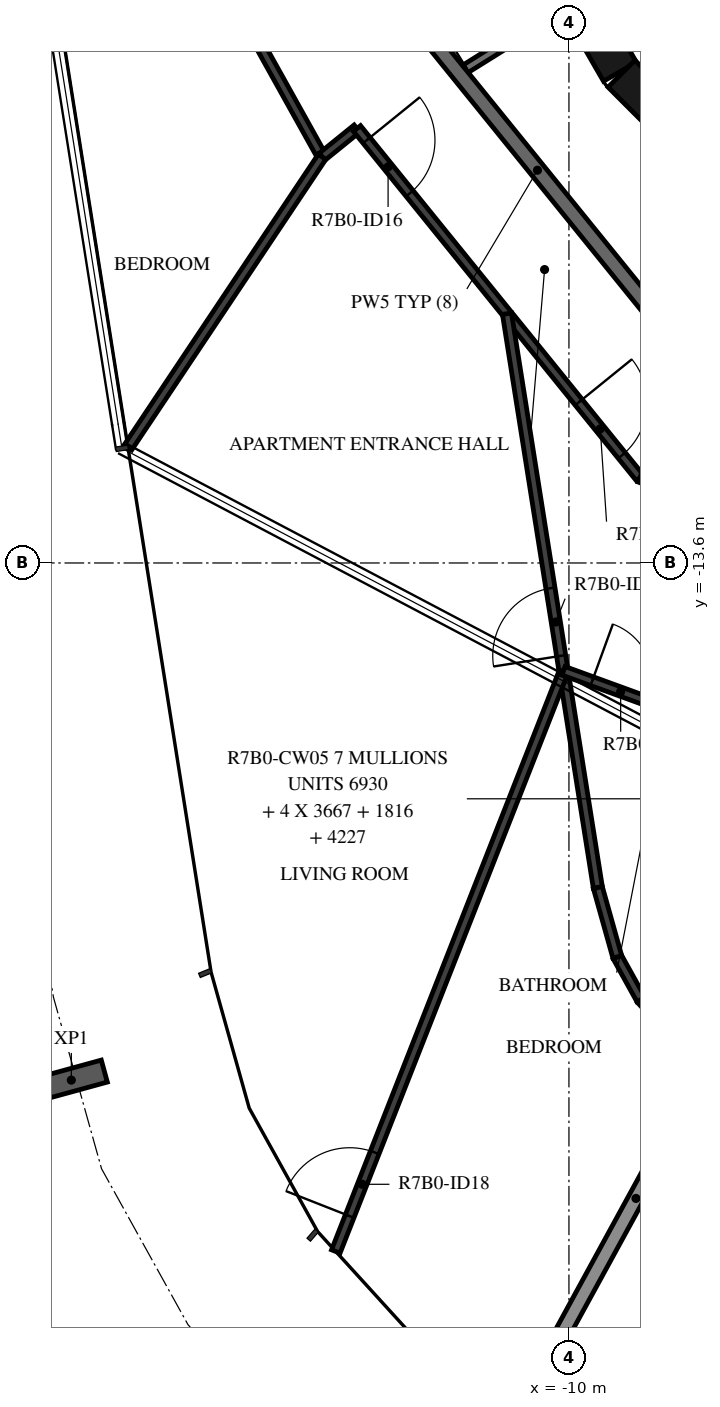
"""IFC4 building model, lengths in metres.
Left out: names, types, materials, properties, quantities, classifications, styles, units other than length and angle.
Written with IfcOpenShell. Run it as: python <this file> out.ifc"""

import sys

from ifc_helpers import new_model, si_unit, direction, frame, frame_2d, origin, origin_2d, place, context, subcontext, project, spatial, rectangle, i_section, extrude, element, fill, save


model = new_model("IFC4")
c1 = context("Model", 3, precision=1e-05, world=origin(), true_north=direction((0.0, 1.0)))
c2 = subcontext(c1, "Body", "Model", "MODEL_VIEW")
j1 = project(units=[si_unit("LENGTHUNIT", "METRE"), si_unit("PLANEANGLEUNIT", "RADIAN")], contexts=[c1])
p1 = place(None, origin())
s1 = spatial("IfcSite", under=j1, at=p1, CompositionType="ELEMENT")
p2 = place(p1, origin())
s2 = spatial("IfcBuilding", under=s1, at=p2, CompositionType="ELEMENT")
p3 = place(p2, frame((0.0, 0.0, 277.4)))
s3 = spatial("IfcBuildingStorey", under=s2, at=p3, CompositionType="ELEMENT", Elevation=277.4)
p4 = place(p3, frame((-16.547, -20.404, -0.38), z_axis=(0.0, 0.0, 1.0), x_axis=(-0.264568938302, 0.964366775084, 0.0)))
e1 = element("IfcColumn", 1, at=p4, inside=s3, PredefinedType="COLUMN", context=c2, shape_type="SweptSolid", body=[
    extrude(i_section(OverallWidth=0.3, OverallDepth=0.9, WebThickness=0.019, FlangeThickness=0.035, FilletRadius=0.03, at=origin_2d()), origin(), (0.0, 0.0, 1.0), 3.5),
])
p5 = place(p3, frame((-10.845, -4.51, 0.0), z_axis=(0.0, 0.0, 1.0), x_axis=(0.500087131594, -0.865975092491, 0.0)))
e2 = element("IfcWall", 2, at=p5, inside=s3, PredefinedType="SHEAR", context=c2, shape_type="SweptSolid", body=[
    extrude(rectangle(XDim=3.033, YDim=0.5, at=frame_2d((1.516, 0.0))), origin(), (0.0, 0.0, 1.0), 3.12),
])
p6 = place(p3, frame((-9.308, -7.164, 0.0), z_axis=(0.0, 0.0, 1.0), x_axis=(0.707106781187, -0.707106781187, 0.0)))
e3 = element("IfcWall", 3, at=p6, inside=s3, PredefinedType="SHEAR", context=c2, shape_type="SweptSolid", body=[
    extrude(rectangle(XDim=3.032, YDim=0.5, at=frame_2d((1.516, 0.0))), origin(), (0.0, 0.0, 1.0), 3.12),
])
p7 = place(p3, frame((-11.449, -7.154, 0.0), z_axis=(0.0, 0.0, 1.0), x_axis=(0.848067047543, 0.529888934468, 0.0)))
e4 = element("IfcWall", 4, at=p7, inside=s3, PredefinedType="PARTITIONING", context=c2, shape_type="SweptSolid", body=[
    extrude(rectangle(XDim=1.596, YDim=0.12, at=frame_2d((0.798, 0.0))), origin(), (0.0, 0.0, 1.0), 3.12),
])
p8 = place(p7, frame((0.12, 0.0, 0.0)))
e5 = element("IfcOpeningElement", 5, at=p8, cuts=e4, PredefinedType="OPENING", context=c2, shape_type="SweptSolid", body=[
    extrude(rectangle(XDim=1.2, YDim=2.1, at=frame_2d((0.6, 1.05))), frame((0.0, 0.07, 0.0), z_axis=(0.0, -1.0, 0.0), x_axis=(1.0, 0.0, 0.0)), (0.0, 0.0, 1.0), 0.14),
])
p9 = place(p3, frame((-12.673, -5.643, 0.0), z_axis=(0.0, 0.0, 1.0), x_axis=(0.629302871585, -0.777160148113, 0.0)))
e6 = element("IfcWall", 6, at=p9, inside=s3, PredefinedType="STANDARD", context=c2, shape_type="SweptSolid", body=[
    extrude(rectangle(XDim=7.181, YDim=0.2, at=frame_2d((3.59, 0.0))), origin(), (0.0, 0.0, 1.0), 3.12),
])
p10 = place(p3, frame((-10.637, -24.738, 0.0), z_axis=(0.0, 0.0, 1.0), x_axis=(0.479683887596, 0.877441375808, 0.0)))
e7 = element("IfcWall", 7, at=p10, inside=s3, PredefinedType="STANDARD", context=c2, shape_type="SweptSolid", body=[
    extrude(rectangle(XDim=6.333, YDim=0.2, at=frame_2d((3.166, 0.0))), origin(), (0.0, 0.0, 1.0), 2.73),
])
p11 = place(p3, frame((-14.088, -6.749, 0.0), z_axis=(0.0, 0.0, 1.0), x_axis=(0.486723752783, -0.873555944675, 0.0)))
e8 = element("IfcWall", 8, at=p11, inside=s3, PredefinedType="PARTITIONING", context=c2, shape_type="SweptSolid", body=[
    extrude(rectangle(XDim=1.726, YDim=0.12, at=frame_2d((0.863, 0.0))), origin(), (0.0, 0.0, 1.0), 3.12),
])
p12 = place(p3, frame((-13.248, -8.257, 0.0), z_axis=(0.0, 0.0, 1.0), x_axis=(0.777071947771, 0.629411779352, 0.0)))
e9 = element("IfcWall", 9, at=p12, inside=s3, PredefinedType="PARTITIONING", context=c2, shape_type="SweptSolid", body=[
    extrude(rectangle(XDim=0.592, YDim=0.12, at=frame_2d((0.296, 0.0))), origin(), (0.0, 0.0, 1.0), 3.12),
])
p13 = place(p3, frame((-12.788, -7.884, 0.0), z_axis=(0.0, 0.0, 1.0), x_axis=(0.6293312414, -0.777137174891, 0.0)))
e10 = element("IfcWall", 10, at=p13, inside=s3, PredefinedType="PARTITIONING", context=c2, shape_type="SweptSolid", body=[
    extrude(rectangle(XDim=5.913, YDim=0.12, at=frame_2d((2.957, 0.0))), origin(), (0.0, 0.0, 1.0), 3.12),
])
p14 = place(p13, frame((0.2, 0.0, 0.0)))
e11 = element("IfcOpeningElement", 11, at=p14, cuts=e10, PredefinedType="OPENING", context=c2, shape_type="SweptSolid", body=[
    extrude(rectangle(XDim=0.9, YDim=2.1, at=frame_2d((0.45, 1.05))), frame((0.0, 0.07, 0.0), z_axis=(0.0, -1.0, 0.0), x_axis=(1.0, 0.0, 0.0)), (0.0, 0.0, 1.0), 0.14),
])
p15 = place(p13, frame((4.635, 0.0, 0.0)))
e12 = element("IfcOpeningElement", 12, at=p15, cuts=e10, PredefinedType="OPENING", context=c2, shape_type="SweptSolid", body=[
    extrude(rectangle(XDim=0.9, YDim=2.1, at=frame_2d((0.45, 1.05))), frame((0.0, 0.07, 0.0), z_axis=(0.0, -1.0, 0.0), x_axis=(1.0, 0.0, 0.0)), (0.0, 0.0, 1.0), 0.14),
])
p16 = place(p3, frame((-9.067, -12.479, 0.0), z_axis=(0.0, 0.0, 1.0), x_axis=(0.933579449035, -0.358370495911, 0.0)))
e13 = element("IfcWall", 13, at=p16, inside=s3, PredefinedType="PARTITIONING", context=c2, shape_type="SweptSolid", body=[
    extrude(rectangle(XDim=7.985, YDim=0.12, at=frame_2d((3.992, 0.0))), origin(), (0.0, 0.0, 1.0), 3.12),
])
p17 = place(p16, frame((4.192, 0.0, 0.0)))
e14 = element("IfcOpeningElement", 14, at=p17, cuts=e13, PredefinedType="OPENING", context=c2, shape_type="SweptSolid", body=[
    extrude(rectangle(XDim=0.9, YDim=2.1, at=frame_2d((0.45, 1.05))), frame((0.0, 0.07, 0.0), z_axis=(0.0, -1.0, 0.0), x_axis=(1.0, 0.0, 0.0)), (0.0, 0.0, 1.0), 0.14),
])
p18 = place(p3, frame((-15.802, -12.08, 0.0), z_axis=(0.0, 0.0, 1.0), x_axis=(0.555386305099, 0.831592479589, 0.0)))
e15 = element("IfcWall", 15, at=p18, inside=s3, PredefinedType="PARTITIONING", context=c2, shape_type="SweptSolid", body=[
    extrude(rectangle(XDim=4.597, YDim=0.12, at=frame_2d((2.299, 0.0))), origin(), (0.0, 0.0, 1.0), 3.12),
])
p19 = place(p3, frame((-9.619, -17.871, 0.0), z_axis=(0.0, 0.0, 1.0), x_axis=(-0.156433255633, 0.987688532146, 0.0)))
e16 = element("IfcWall", 16, at=p19, inside=s3, PredefinedType="PARTITIONING", context=c2, shape_type="SweptSolid", body=[
    extrude(rectangle(XDim=7.644, YDim=0.12, at=frame_2d((3.822, 0.0))), origin(), (0.0, 0.0, 1.0), 3.12),
])
p20 = place(p19, frame((3.087, 0.0, 0.0)))
e17 = element("IfcOpeningElement", 17, at=p20, cuts=e16, PredefinedType="OPENING", context=c2, shape_type="SweptSolid", body=[
    extrude(rectangle(XDim=0.9, YDim=2.1, at=frame_2d((0.45, 1.05))), frame((0.0, 0.07, 0.0), z_axis=(0.0, -1.0, 0.0), x_axis=(1.0, 0.0, 0.0)), (0.0, 0.0, 1.0), 0.14),
])
p21 = place(p3, frame((-13.067, -22.658, 0.0), z_axis=(0.0, 0.0, 1.0), x_axis=(0.365785999331, 0.930698986082, 0.0)))
e18 = element("IfcWall", 18, at=p21, inside=s3, PredefinedType="PARTITIONING", context=c2, shape_type="SweptSolid", body=[
    extrude(rectangle(XDim=8.196, YDim=0.12, at=frame_2d((4.098, 0.0))), origin(), (0.0, 0.0, 1.0), 3.12),
])
p22 = place(p21, frame((0.5, 0.0, 0.0)))
e19 = element("IfcOpeningElement", 19, at=p22, cuts=e18, PredefinedType="OPENING", context=c2, shape_type="SweptSolid", body=[
    extrude(rectangle(XDim=0.9, YDim=2.1, at=frame_2d((0.45, 1.05))), frame((0.0, 0.07, 0.0), z_axis=(0.0, -1.0, 0.0), x_axis=(1.0, 0.0, 0.0)), (0.0, 0.0, 1.0), 0.14),
])
p23 = place(p3, frame((-10.071, -15.019, 0.0), z_axis=(0.0, 0.0, 1.0), x_axis=(0.939648507355, -0.34214131967, 0.0)))
e20 = element("IfcWall", 20, at=p23, inside=s3, PredefinedType="PARTITIONING", context=c2, shape_type="SweptSolid", body=[
    extrude(rectangle(XDim=3.691, YDim=0.12, at=frame_2d((1.846, 0.0))), origin(), (0.0, 0.0, 1.0), 3.12),
])
p24 = place(p23, frame((0.4, 0.0, 0.0)))
e21 = element("IfcOpeningElement", 21, at=p24, cuts=e20, PredefinedType="OPENING", context=c2, shape_type="SweptSolid", body=[
    extrude(rectangle(XDim=0.8, YDim=2.1, at=frame_2d((0.4, 1.05))), frame((0.0, 0.07, 0.0), z_axis=(0.0, -1.0, 0.0), x_axis=(1.0, 0.0, 0.0)), (0.0, 0.0, 1.0), 0.14),
])
for number, where, z_axis, x_axis in (
    (22, (-8.62, -19.818, 0.0), (0.0, 0.0, 1.0), (-0.673, 0.739, 0.0)),
    (23, (-9.052, -19.344, 0.0), (0.0, 0.0, 1.0), (-0.485, 0.874, 0.0)),
):
    element("IfcWall", number, at=place(p3, frame(where, z_axis=z_axis, x_axis=x_axis)), inside=s3, PredefinedType="PARTITIONING", context=c2, shape_type="SweptSolid", body=[
        extrude(rectangle(XDim=0.642, YDim=0.12, at=frame_2d((0.321, 0.0))), origin(), (0.0, 0.0, 1.0), 3.12),
    ])
p25 = place(p3, frame((-9.364, -18.782, 0.0), z_axis=(0.0, 0.0, 1.0), x_axis=(-0.269811707714, 0.962913102196, 0.0)))
e24 = element("IfcWall", 24, at=p25, inside=s3, PredefinedType="PARTITIONING", context=c2, shape_type="SweptSolid", body=[
    extrude(rectangle(XDim=0.947, YDim=0.12, at=frame_2d((0.473, 0.0))), origin(), (0.0, 0.0, 1.0), 3.12),
])
p26 = place(p14, origin())
e25 = element("IfcDoor", 25, at=p26, inside=s3, OperationType="SINGLE_SWING_RIGHT", PredefinedType="DOOR", context=c2, shape_type="SweptSolid", body=[
    extrude(rectangle(XDim=0.9, YDim=2.1, at=frame_2d((0.45, 1.05))), frame((0.0, 0.025, 0.0), z_axis=(0.0, -1.0, 0.0), x_axis=(1.0, 0.0, 0.0)), (0.0, 0.0, 1.0), 0.05),
])
fill(e11, e25)
p27 = place(p15, origin())
e26 = element("IfcDoor", 26, at=p27, inside=s3, OperationType="SINGLE_SWING_RIGHT", PredefinedType="DOOR", context=c2, shape_type="SweptSolid", body=[
    extrude(rectangle(XDim=0.9, YDim=2.1, at=frame_2d((0.45, 1.05))), frame((0.0, 0.025, 0.0), z_axis=(0.0, -1.0, 0.0), x_axis=(1.0, 0.0, 0.0)), (0.0, 0.0, 1.0), 0.05),
])
fill(e12, e26)
p28 = place(p22, origin())
e27 = element("IfcDoor", 27, at=p28, inside=s3, OperationType="SINGLE_SWING_RIGHT", PredefinedType="DOOR", context=c2, shape_type="SweptSolid", body=[
    extrude(rectangle(XDim=0.9, YDim=2.1, at=frame_2d((0.45, 1.05))), frame((0.0, 0.025, 0.0), z_axis=(0.0, -1.0, 0.0), x_axis=(1.0, 0.0, 0.0)), (0.0, 0.0, 1.0), 0.05),
])
fill(e19, e27)
p29 = place(p24, origin())
e28 = element("IfcDoor", 28, at=p29, inside=s3, OperationType="SINGLE_SWING_RIGHT", PredefinedType="DOOR", context=c2, shape_type="SweptSolid", body=[
    extrude(rectangle(XDim=0.8, YDim=2.1, at=frame_2d((0.4, 1.05))), frame((0.0, 0.025, 0.0), z_axis=(0.0, -1.0, 0.0), x_axis=(1.0, 0.0, 0.0)), (0.0, 0.0, 1.0), 0.05),
])
fill(e21, e28)
p30 = place(p20, origin())
e29 = element("IfcDoor", 29, at=p30, inside=s3, OperationType="SINGLE_SWING_LEFT", PredefinedType="DOOR", context=c2, shape_type="SweptSolid", body=[
    extrude(rectangle(XDim=0.9, YDim=2.1, at=frame_2d((0.45, 1.05))), frame((0.0, 0.025, 0.0), z_axis=(0.0, -1.0, 0.0), x_axis=(1.0, 0.0, 0.0)), (0.0, 0.0, 1.0), 0.05),
])
fill(e17, e29)
p31 = place(p8, origin())
e30 = element("IfcDoor", 30, at=p31, inside=s3, OperationType="DOUBLE_DOOR_SINGLE_SWING", PredefinedType="DOOR", context=c2, shape_type="SweptSolid", body=[
    extrude(rectangle(XDim=1.2, YDim=2.1, at=frame_2d((0.6, 1.05))), frame((0.0, 0.025, 0.0), z_axis=(0.0, -1.0, 0.0), x_axis=(1.0, 0.0, 0.0)), (0.0, 0.0, 1.0), 0.05),
])
fill(e5, e30)
save(model, sys.argv[1])
